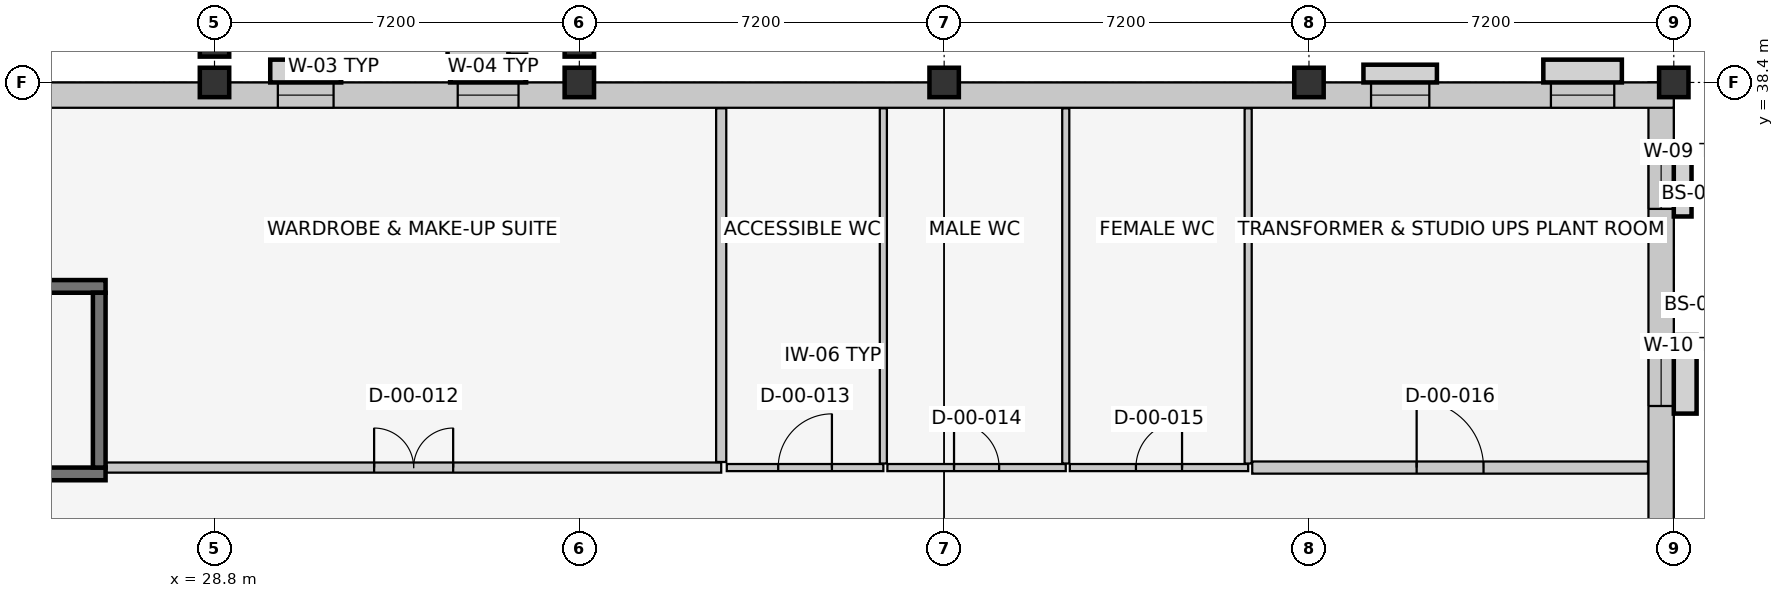
"""IFC4 building model, lengths in metres.
Left out: names, types, materials, properties, quantities, classifications, styles, units other than length and angle.
Written with IfcOpenShell. Run it as: python <this file> out.ifc"""

import sys

from ifc_helpers import new_model, si_unit, direction, frame, frame_2d, origin, origin_2d, place, context, subcontext, project, spatial, rectangle, extrude, element, fill, save


model = new_model("IFC4")
c1 = context("Model", 3, precision=1e-05, world=origin(), true_north=direction((0.0, 1.0)))
c2 = subcontext(c1, "Body", "Model", "MODEL_VIEW")
j1 = project(units=[si_unit("LENGTHUNIT", "METRE"), si_unit("PLANEANGLEUNIT", "RADIAN")], contexts=[c1])
p1 = place(None, origin())
s1 = spatial("IfcSite", under=j1, at=p1, CompositionType="ELEMENT")
p2 = place(p1, origin())
s2 = spatial("IfcBuilding", under=s1, at=p2, CompositionType="ELEMENT")
p3 = place(p2, origin())
s3 = spatial("IfcBuildingStorey", under=s2, at=p3, CompositionType="ELEMENT", Elevation=0.0)
for number, where, z_axis, x_axis in (
    (1, (28.8, 38.4, 0.0), (0.0, 0.0, 1.0), (1.0, 0.0, 0.0)),
    (2, (36.0, 38.4, 0.0), (0.0, 0.0, 1.0), (1.0, 0.0, 0.0)),
    (3, (43.2, 38.4, 0.0), (0.0, 0.0, 1.0), (1.0, 0.0, 0.0)),
    (4, (50.4, 38.4, 0.0), (0.0, 0.0, 1.0), (1.0, 0.0, 0.0)),
    (5, (57.6, 38.4, 0.0), (0.0, 0.0, 1.0), (1.0, 0.0, 0.0)),
    (6, (28.8, 39.2, 0.0), (0.0, 0.0, 1.0), (1.0, 0.0, 0.0)),
    (7, (36.0, 39.2, 0.0), (0.0, 0.0, 1.0), (1.0, 0.0, 0.0)),
):
    element("IfcColumn", number, at=place(p3, frame(where, z_axis=z_axis, x_axis=x_axis)), inside=s3, PredefinedType="COLUMN", context=c2, shape_type="SweptSolid", body=[
        extrude(rectangle(XDim=0.58, YDim=0.58, at=origin_2d()), origin(), (0.0, 0.0, 1.0), 5.4),
    ])
p4 = place(p3, frame((57.35, 38.4, 0.0), z_axis=(0.0, 0.0, 1.0), x_axis=(0.0, -1.0, 0.0)))
e8 = element("IfcWall", 8, at=p4, inside=s3, PredefinedType="SOLIDWALL", context=c2, shape_type="SweptSolid", body=[
    extrude(rectangle(XDim=38.4, YDim=0.5, at=frame_2d((19.2, 0.0))), origin(), (0.0, 0.0, 1.0), 4.255),
])
p5 = place(p4, frame((10.9, 0.0, 0.0)))
e9 = element("IfcOpeningElement", 9, at=p5, cuts=e8, PredefinedType="OPENING", context=c2, shape_type="SweptSolid", body=[
    extrude(rectangle(XDim=2.2, YDim=2.4, at=frame_2d((1.1, 1.2))), frame((0.0, 0.262, 0.0), z_axis=(0.0, -1.0, 0.0), x_axis=(1.0, 0.0, 0.0)), (0.0, 0.0, 1.0), 0.524),
])
p6 = place(p4, frame((1.345, 0.0, 0.9)))
e10 = element("IfcOpeningElement", 10, at=p6, cuts=e8, PredefinedType="OPENING", context=c2, shape_type="SweptSolid", body=[
    extrude(rectangle(XDim=1.15, YDim=1.45, at=frame_2d((0.575, 0.725))), frame((0.0, 0.262, 0.0), z_axis=(0.0, -1.0, 0.0), x_axis=(1.0, 0.0, 0.0)), (0.0, 0.0, 1.0), 0.524),
])
p7 = place(p4, frame((5.135, 0.0, 0.9)))
e11 = element("IfcOpeningElement", 11, at=p7, cuts=e8, PredefinedType="OPENING", context=c2, shape_type="SweptSolid", body=[
    extrude(rectangle(XDim=1.25, YDim=1.45, at=frame_2d((0.625, 0.725))), frame((0.0, 0.262, 0.0), z_axis=(0.0, -1.0, 0.0), x_axis=(1.0, 0.0, 0.0)), (0.0, 0.0, 1.0), 0.524),
])
p8 = place(p4, frame((20.595, 0.0, 0.9)))
e12 = element("IfcOpeningElement", 12, at=p8, cuts=e8, PredefinedType="OPENING", context=c2, shape_type="SweptSolid", body=[
    extrude(rectangle(XDim=1.05, YDim=1.6, at=frame_2d((0.525, 0.8))), frame((0.0, 0.262, 0.0), z_axis=(0.0, -1.0, 0.0), x_axis=(1.0, 0.0, 0.0)), (0.0, 0.0, 1.0), 0.524),
])
p9 = place(p4, frame((28.175, 0.0, 0.9)))
e13 = element("IfcOpeningElement", 13, at=p9, cuts=e8, PredefinedType="OPENING", context=c2, shape_type="SweptSolid", body=[
    extrude(rectangle(XDim=1.25, YDim=1.6, at=frame_2d((0.625, 0.8))), frame((0.0, 0.262, 0.0), z_axis=(0.0, -1.0, 0.0), x_axis=(1.0, 0.0, 0.0)), (0.0, 0.0, 1.0), 0.524),
])
p10 = place(p4, frame((35.73, 0.0, 0.9)))
e14 = element("IfcOpeningElement", 14, at=p10, cuts=e8, PredefinedType="OPENING", context=c2, shape_type="SweptSolid", body=[
    extrude(rectangle(XDim=1.5, YDim=1.6, at=frame_2d((0.75, 0.8))), frame((0.0, 0.262, 0.0), z_axis=(0.0, -1.0, 0.0), x_axis=(1.0, 0.0, 0.0)), (0.0, 0.0, 1.0), 0.524),
])
p11 = place(p3, frame((0.0, 38.15, 0.0), z_axis=(0.0, 0.0, 1.0), x_axis=(1.0, 0.0, 0.0)))
e15 = element("IfcWall", 15, at=p11, inside=s3, PredefinedType="SOLIDWALL", context=c2, shape_type="SweptSolid", body=[
    extrude(rectangle(XDim=57.6, YDim=0.5, at=frame_2d((28.8, 0.0))), origin(), (0.0, 0.0, 1.0), 4.395),
])
p12 = place(p11, frame((9.9, 0.0, 0.0)))
e16 = element("IfcOpeningElement", 16, at=p12, cuts=e15, PredefinedType="OPENING", context=c2, shape_type="SweptSolid", body=[
    extrude(rectangle(XDim=1.8, YDim=2.3, at=frame_2d((0.9, 1.15))), frame((0.0, 0.262, 0.0), z_axis=(0.0, -1.0, 0.0), x_axis=(1.0, 0.0, 0.0)), (0.0, 0.0, 1.0), 0.524),
])
p13 = place(p11, frame((1.3, 0.0, 0.9)))
e17 = element("IfcOpeningElement", 17, at=p13, cuts=e15, PredefinedType="OPENING", context=c2, shape_type="SweptSolid", body=[
    extrude(rectangle(XDim=1.0, YDim=1.75, at=frame_2d((0.5, 0.875))), frame((0.0, 0.262, 0.0), z_axis=(0.0, -1.0, 0.0), x_axis=(1.0, 0.0, 0.0)), (0.0, 0.0, 1.0), 0.524),
])
p14 = place(p11, frame((4.84, 0.0, 0.9)))
e18 = element("IfcOpeningElement", 18, at=p14, cuts=e15, PredefinedType="OPENING", context=c2, shape_type="SweptSolid", body=[
    extrude(rectangle(XDim=1.12, YDim=1.75, at=frame_2d((0.56, 0.875))), frame((0.0, 0.262, 0.0), z_axis=(0.0, -1.0, 0.0), x_axis=(1.0, 0.0, 0.0)), (0.0, 0.0, 1.0), 0.524),
])
p15 = place(p11, frame((15.48, 0.0, 0.9)))
e19 = element("IfcOpeningElement", 19, at=p15, cuts=e15, PredefinedType="OPENING", context=c2, shape_type="SweptSolid", body=[
    extrude(rectangle(XDim=1.44, YDim=1.75, at=frame_2d((0.72, 0.875))), frame((0.0, 0.262, 0.0), z_axis=(0.0, -1.0, 0.0), x_axis=(1.0, 0.0, 0.0)), (0.0, 0.0, 1.0), 0.524),
])
p16 = place(p11, frame((19.05, 0.0, 0.9)))
e20 = element("IfcOpeningElement", 20, at=p16, cuts=e15, PredefinedType="OPENING", context=c2, shape_type="SweptSolid", body=[
    extrude(rectangle(XDim=1.5, YDim=1.75, at=frame_2d((0.75, 0.875))), frame((0.0, 0.262, 0.0), z_axis=(0.0, -1.0, 0.0), x_axis=(1.0, 0.0, 0.0)), (0.0, 0.0, 1.0), 0.524),
])
p17 = place(p11, frame((22.95, 0.0, 0.9)))
e21 = element("IfcOpeningElement", 21, at=p17, cuts=e15, PredefinedType="OPENING", context=c2, shape_type="SweptSolid", body=[
    extrude(rectangle(XDim=0.9, YDim=1.35, at=frame_2d((0.45, 0.675))), frame((0.0, 0.262, 0.0), z_axis=(0.0, -1.0, 0.0), x_axis=(1.0, 0.0, 0.0)), (0.0, 0.0, 1.0), 0.524),
])
p18 = place(p11, frame((30.05, 0.0, 0.9)))
e22 = element("IfcOpeningElement", 22, at=p18, cuts=e15, PredefinedType="OPENING", context=c2, shape_type="SweptSolid", body=[
    extrude(rectangle(XDim=1.1, YDim=1.35, at=frame_2d((0.55, 0.675))), frame((0.0, 0.262, 0.0), z_axis=(0.0, -1.0, 0.0), x_axis=(1.0, 0.0, 0.0)), (0.0, 0.0, 1.0), 0.524),
])
p19 = place(p11, frame((33.6, 0.0, 0.9)))
e23 = element("IfcOpeningElement", 23, at=p19, cuts=e15, PredefinedType="OPENING", context=c2, shape_type="SweptSolid", body=[
    extrude(rectangle(XDim=1.2, YDim=1.35, at=frame_2d((0.6, 0.675))), frame((0.0, 0.262, 0.0), z_axis=(0.0, -1.0, 0.0), x_axis=(1.0, 0.0, 0.0)), (0.0, 0.0, 1.0), 0.524),
])
p20 = place(p11, frame((51.625, 0.0, 0.9)))
e24 = element("IfcOpeningElement", 24, at=p20, cuts=e15, PredefinedType="OPENING", context=c2, shape_type="SweptSolid", body=[
    extrude(rectangle(XDim=1.15, YDim=1.45, at=frame_2d((0.575, 0.725))), frame((0.0, 0.262, 0.0), z_axis=(0.0, -1.0, 0.0), x_axis=(1.0, 0.0, 0.0)), (0.0, 0.0, 1.0), 0.524),
])
p21 = place(p11, frame((55.175, 0.0, 0.9)))
e25 = element("IfcOpeningElement", 25, at=p21, cuts=e15, PredefinedType="OPENING", context=c2, shape_type="SweptSolid", body=[
    extrude(rectangle(XDim=1.25, YDim=1.45, at=frame_2d((0.625, 0.725))), frame((0.0, 0.262, 0.0), z_axis=(0.0, -1.0, 0.0), x_axis=(1.0, 0.0, 0.0)), (0.0, 0.0, 1.0), 0.524),
])
for number, where, z_axis, x_axis in (
    (26, (17.75, 30.675, 0.0), (0.0, 0.0, 1.0), (1.0, 0.0, 0.0)),
    (27, (26.65, 34.375, 0.0), (0.0, 0.0, 1.0), (-1.0, 0.0, 0.0)),
):
    element("IfcWall", number, at=place(p3, frame(where, z_axis=z_axis, x_axis=x_axis)), inside=s3, PredefinedType="SHEAR", context=c2, shape_type="SweptSolid", body=[
        extrude(rectangle(XDim=8.9, YDim=0.25, at=frame_2d((4.45, 0.0))), origin(), (0.0, 0.0, 1.0), 5.1),
    ])
p22 = place(p3, frame((26.525, 30.8, 0.0), z_axis=(0.0, 0.0, 1.0), x_axis=(0.0, 1.0, 0.0)))
e28 = element("IfcWall", 28, at=p22, inside=s3, PredefinedType="SHEAR", context=c2, shape_type="SweptSolid", body=[
    extrude(rectangle(XDim=3.45, YDim=0.25, at=frame_2d((1.725, 0.0))), origin(), (0.0, 0.0, 1.0), 5.1),
])
p23 = place(p3, frame((26.66, 30.8, 0.0), z_axis=(0.0, 0.0, 1.0), x_axis=(1.0, 0.0, 0.0)))
e29 = element("IfcWall", 29, at=p23, inside=s3, PredefinedType="PARTITIONING", context=c2, shape_type="SweptSolid", body=[
    extrude(rectangle(XDim=12.14, YDim=0.2, at=frame_2d((6.07, 0.0))), origin(), (0.0, 0.0, 1.0), 5.1),
])
p24 = place(p23, frame((5.29, 0.0, 0.0)))
e30 = element("IfcOpeningElement", 30, at=p24, cuts=e29, PredefinedType="OPENING", context=c2, shape_type="SweptSolid", body=[
    extrude(rectangle(XDim=1.56, YDim=2.25, at=frame_2d((0.78, 1.125))), frame((0.0, 0.112, 0.0), z_axis=(0.0, -1.0, 0.0), x_axis=(1.0, 0.0, 0.0)), (0.0, 0.0, 1.0), 0.224),
])
p25 = place(p3, frame((38.8, 30.91, 0.0), z_axis=(0.0, 0.0, 1.0), x_axis=(0.0, 1.0, 0.0)))
e31 = element("IfcWall", 31, at=p25, inside=s3, PredefinedType="PARTITIONING", context=c2, shape_type="SweptSolid", body=[
    extrude(rectangle(XDim=6.98, YDim=0.2, at=frame_2d((3.49, 0.0))), origin(), (0.0, 0.0, 1.0), 5.1),
])
p26 = place(p3, frame((38.91, 30.8, 0.0), z_axis=(0.0, 0.0, 1.0), x_axis=(1.0, 0.0, 0.0)))
e32 = element("IfcWall", 32, at=p26, inside=s3, PredefinedType="PARTITIONING", context=c2, shape_type="SweptSolid", body=[
    extrude(rectangle(XDim=3.09, YDim=0.14, at=frame_2d((1.545, 0.0))), origin(), (0.0, 0.0, 1.0), 5.1),
])
p27 = place(p26, frame((1.015, 0.0, 0.0)))
e33 = element("IfcOpeningElement", 33, at=p27, cuts=e32, PredefinedType="OPENING", context=c2, shape_type="SweptSolid", body=[
    extrude(rectangle(XDim=1.06, YDim=2.1, at=frame_2d((0.53, 1.05))), frame((0.0, 0.082, 0.0), z_axis=(0.0, -1.0, 0.0), x_axis=(1.0, 0.0, 0.0)), (0.0, 0.0, 1.0), 0.164),
])
p28 = place(p3, frame((42.0, 30.88, 0.0), z_axis=(0.0, 0.0, 1.0), x_axis=(0.0, 1.0, 0.0)))
e34 = element("IfcWall", 34, at=p28, inside=s3, PredefinedType="PARTITIONING", context=c2, shape_type="SweptSolid", body=[
    extrude(rectangle(XDim=7.01, YDim=0.14, at=frame_2d((3.505, 0.0))), origin(), (0.0, 0.0, 1.0), 5.1),
])
p29 = place(p3, frame((42.08, 30.8, 0.0), z_axis=(0.0, 0.0, 1.0), x_axis=(1.0, 0.0, 0.0)))
e35 = element("IfcWall", 35, at=p29, inside=s3, PredefinedType="PARTITIONING", context=c2, shape_type="SweptSolid", body=[
    extrude(rectangle(XDim=3.52, YDim=0.14, at=frame_2d((1.76, 0.0))), origin(), (0.0, 0.0, 1.0), 5.1),
])
p30 = place(p29, frame((1.315, 0.0, 0.0)))
e36 = element("IfcOpeningElement", 36, at=p30, cuts=e35, PredefinedType="OPENING", context=c2, shape_type="SweptSolid", body=[
    extrude(rectangle(XDim=0.89, YDim=2.05, at=frame_2d((0.445, 1.025))), frame((0.0, 0.082, 0.0), z_axis=(0.0, -1.0, 0.0), x_axis=(1.0, 0.0, 0.0)), (0.0, 0.0, 1.0), 0.164),
])
p31 = place(p3, frame((45.6, 30.88, 0.0), z_axis=(0.0, 0.0, 1.0), x_axis=(0.0, 1.0, 0.0)))
e37 = element("IfcWall", 37, at=p31, inside=s3, PredefinedType="PARTITIONING", context=c2, shape_type="SweptSolid", body=[
    extrude(rectangle(XDim=7.01, YDim=0.14, at=frame_2d((3.505, 0.0))), origin(), (0.0, 0.0, 1.0), 5.1),
])
p32 = place(p3, frame((45.68, 30.8, 0.0), z_axis=(0.0, 0.0, 1.0), x_axis=(1.0, 0.0, 0.0)))
e38 = element("IfcWall", 38, at=p32, inside=s3, PredefinedType="PARTITIONING", context=c2, shape_type="SweptSolid", body=[
    extrude(rectangle(XDim=3.52, YDim=0.14, at=frame_2d((1.76, 0.0))), origin(), (0.0, 0.0, 1.0), 5.1),
])
p33 = place(p32, frame((1.305, 0.0, 0.0)))
e39 = element("IfcOpeningElement", 39, at=p33, cuts=e38, PredefinedType="OPENING", context=c2, shape_type="SweptSolid", body=[
    extrude(rectangle(XDim=0.91, YDim=2.06, at=frame_2d((0.455, 1.03))), frame((0.0, 0.082, 0.0), z_axis=(0.0, -1.0, 0.0), x_axis=(1.0, 0.0, 0.0)), (0.0, 0.0, 1.0), 0.164),
])
p34 = place(p3, frame((49.2, 30.88, 0.0), z_axis=(0.0, 0.0, 1.0), x_axis=(0.0, 1.0, 0.0)))
e40 = element("IfcWall", 40, at=p34, inside=s3, PredefinedType="PARTITIONING", context=c2, shape_type="SweptSolid", body=[
    extrude(rectangle(XDim=7.01, YDim=0.14, at=frame_2d((3.505, 0.0))), origin(), (0.0, 0.0, 1.0), 5.1),
])
p35 = place(p3, frame((49.28, 30.8, 0.0), z_axis=(0.0, 0.0, 1.0), x_axis=(1.0, 0.0, 0.0)))
e41 = element("IfcWall", 41, at=p35, inside=s3, PredefinedType="PARTITIONING", context=c2, shape_type="SweptSolid", body=[
    extrude(rectangle(XDim=7.81, YDim=0.24, at=frame_2d((3.905, 0.0))), origin(), (0.0, 0.0, 1.0), 5.1),
])
p36 = place(p35, frame((3.245, 0.0, 0.0)))
e42 = element("IfcOpeningElement", 42, at=p36, cuts=e41, PredefinedType="OPENING", context=c2, shape_type="SweptSolid", body=[
    extrude(rectangle(XDim=1.32, YDim=2.15, at=frame_2d((0.66, 1.075))), frame((0.0, 0.132, 0.0), z_axis=(0.0, -1.0, 0.0), x_axis=(1.0, 0.0, 0.0)), (0.0, 0.0, 1.0), 0.264),
])
p37 = place(p6, origin())
e43 = element("IfcWindow", 43, at=p37, inside=s3, PartitioningType="SINGLE_PANEL", PredefinedType="WINDOW", context=c2, shape_type="SweptSolid", body=[
    extrude(rectangle(XDim=1.15, YDim=1.45, at=frame_2d((0.575, 0.725))), frame((0.0, 0.03, 0.0), z_axis=(0.0, -1.0, 0.0), x_axis=(1.0, 0.0, 0.0)), (0.0, 0.0, 1.0), 0.06),
])
fill(e10, e43)
p38 = place(p7, origin())
e44 = element("IfcWindow", 44, at=p38, inside=s3, PartitioningType="SINGLE_PANEL", PredefinedType="WINDOW", context=c2, shape_type="SweptSolid", body=[
    extrude(rectangle(XDim=1.25, YDim=1.45, at=frame_2d((0.625, 0.725))), frame((0.0, 0.03, 0.0), z_axis=(0.0, -1.0, 0.0), x_axis=(1.0, 0.0, 0.0)), (0.0, 0.0, 1.0), 0.06),
])
fill(e11, e44)
p39 = place(p18, origin())
e45 = element("IfcWindow", 45, at=p39, inside=s3, PartitioningType="SINGLE_PANEL", PredefinedType="WINDOW", context=c2, shape_type="SweptSolid", body=[
    extrude(rectangle(XDim=1.1, YDim=1.35, at=frame_2d((0.55, 0.675))), frame((0.0, 0.03, 0.0), z_axis=(0.0, -1.0, 0.0), x_axis=(1.0, 0.0, 0.0)), (0.0, 0.0, 1.0), 0.06),
])
fill(e22, e45)
p40 = place(p19, origin())
e46 = element("IfcWindow", 46, at=p40, inside=s3, PartitioningType="SINGLE_PANEL", PredefinedType="WINDOW", context=c2, shape_type="SweptSolid", body=[
    extrude(rectangle(XDim=1.2, YDim=1.35, at=frame_2d((0.6, 0.675))), frame((0.0, 0.03, 0.0), z_axis=(0.0, -1.0, 0.0), x_axis=(1.0, 0.0, 0.0)), (0.0, 0.0, 1.0), 0.06),
])
fill(e23, e46)
p41 = place(p20, origin())
e47 = element("IfcWindow", 47, at=p41, inside=s3, PartitioningType="SINGLE_PANEL", PredefinedType="WINDOW", context=c2, shape_type="SweptSolid", body=[
    extrude(rectangle(XDim=1.15, YDim=1.45, at=frame_2d((0.575, 0.725))), frame((0.0, 0.03, 0.0), z_axis=(0.0, -1.0, 0.0), x_axis=(1.0, 0.0, 0.0)), (0.0, 0.0, 1.0), 0.06),
])
fill(e24, e47)
p42 = place(p21, origin())
e48 = element("IfcWindow", 48, at=p42, inside=s3, PartitioningType="SINGLE_PANEL", PredefinedType="WINDOW", context=c2, shape_type="SweptSolid", body=[
    extrude(rectangle(XDim=1.25, YDim=1.45, at=frame_2d((0.625, 0.725))), frame((0.0, 0.03, 0.0), z_axis=(0.0, -1.0, 0.0), x_axis=(1.0, 0.0, 0.0)), (0.0, 0.0, 1.0), 0.06),
])
fill(e25, e48)
p43 = place(p24, origin())
e49 = element("IfcDoor", 49, at=p43, inside=s3, OperationType="DOUBLE_DOOR_SINGLE_SWING", PredefinedType="DOOR", context=c2, shape_type="SweptSolid", body=[
    extrude(rectangle(XDim=1.56, YDim=2.25, at=frame_2d((0.78, 1.125))), frame((0.0, 0.025, 0.0), z_axis=(0.0, -1.0, 0.0), x_axis=(1.0, 0.0, 0.0)), (0.0, 0.0, 1.0), 0.05),
])
fill(e30, e49)
p44 = place(p27, origin())
e50 = element("IfcDoor", 50, at=p44, inside=s3, OperationType="SINGLE_SWING_RIGHT", PredefinedType="DOOR", context=c2, shape_type="SweptSolid", body=[
    extrude(rectangle(XDim=1.06, YDim=2.1, at=frame_2d((0.53, 1.05))), frame((0.0, 0.025, 0.0), z_axis=(0.0, -1.0, 0.0), x_axis=(1.0, 0.0, 0.0)), (0.0, 0.0, 1.0), 0.05),
])
fill(e33, e50)
p45 = place(p30, origin())
e51 = element("IfcDoor", 51, at=p45, inside=s3, OperationType="SINGLE_SWING_LEFT", PredefinedType="DOOR", context=c2, shape_type="SweptSolid", body=[
    extrude(rectangle(XDim=0.89, YDim=2.05, at=frame_2d((0.445, 1.025))), frame((0.0, 0.025, 0.0), z_axis=(0.0, -1.0, 0.0), x_axis=(1.0, 0.0, 0.0)), (0.0, 0.0, 1.0), 0.05),
])
fill(e36, e51)
p46 = place(p33, origin())
e52 = element("IfcDoor", 52, at=p46, inside=s3, OperationType="SINGLE_SWING_RIGHT", PredefinedType="DOOR", context=c2, shape_type="SweptSolid", body=[
    extrude(rectangle(XDim=0.91, YDim=2.06, at=frame_2d((0.455, 1.03))), frame((0.0, 0.025, 0.0), z_axis=(0.0, -1.0, 0.0), x_axis=(1.0, 0.0, 0.0)), (0.0, 0.0, 1.0), 0.05),
])
fill(e39, e52)
p47 = place(p36, origin())
e53 = element("IfcDoor", 53, at=p47, inside=s3, OperationType="SINGLE_SWING_LEFT", PredefinedType="DOOR", context=c2, shape_type="SweptSolid", body=[
    extrude(rectangle(XDim=1.32, YDim=2.15, at=frame_2d((0.66, 1.075))), frame((0.0, 0.025, 0.0), z_axis=(0.0, -1.0, 0.0), x_axis=(1.0, 0.0, 0.0)), (0.0, 0.0, 1.0), 0.05),
])
fill(e42, e53)
save(model, sys.argv[1])
